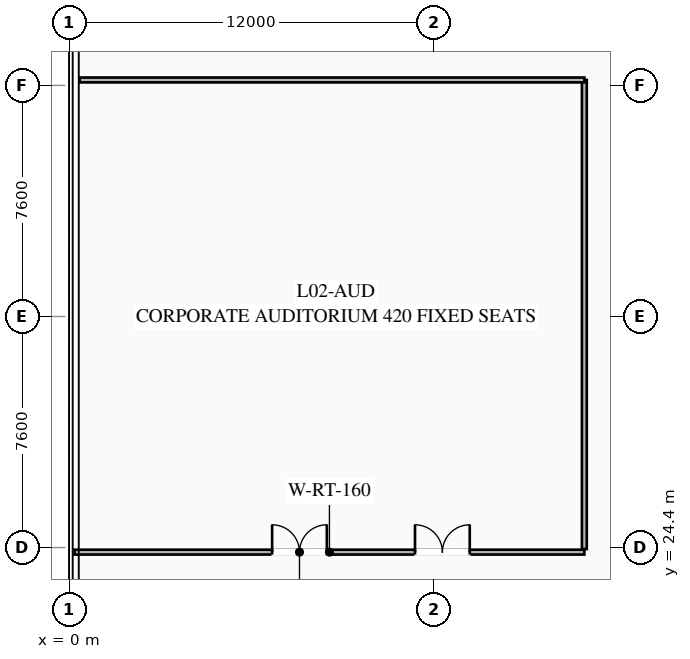
"""IFC4 building model, lengths in metres.
Left out: names, types, materials, properties, quantities, classifications, styles, units other than length and angle.
Written with IfcOpenShell. Run it as: python <this file> out.ifc"""

import sys

from ifc_helpers import new_model, si_unit, direction, frame, frame_2d, origin, place, context, subcontext, project, spatial, rectangle, extrude, element, fill, save


model = new_model("IFC4")
c1 = context("Model", 3, precision=1e-05, world=origin(), true_north=direction((0.0, 1.0)))
c2 = subcontext(c1, "Body", "Model", "MODEL_VIEW")
j1 = project(units=[si_unit("LENGTHUNIT", "METRE"), si_unit("PLANEANGLEUNIT", "RADIAN")], contexts=[c1])
p1 = place(None, origin())
s1 = spatial("IfcSite", under=j1, at=p1, CompositionType="ELEMENT")
p2 = place(p1, origin())
s2 = spatial("IfcBuilding", under=s1, at=p2, CompositionType="ELEMENT")
p3 = place(p2, frame((0.0, 0.0, 10.2)))
s3 = spatial("IfcBuildingStorey", under=s2, at=p3, CompositionType="ELEMENT", Elevation=10.2)
p4 = place(p3, frame((0.18, 24.25, 0.0), z_axis=(0.0, 0.0, 1.0), x_axis=(1.0, 0.0, 0.0)))
e1 = element("IfcWall", 1, at=p4, inside=s3, PredefinedType="PARTITIONING", context=c2, shape_type="SweptSolid", body=[
    extrude(rectangle(XDim=16.77, YDim=0.16, at=frame_2d((8.385, 0.0))), origin(), (0.0, 0.0, 1.0), 2.71),
])
p5 = place(p4, frame((6.5, 0.0, 0.0)))
e2 = element("IfcOpeningElement", 2, at=p5, cuts=e1, PredefinedType="OPENING", context=c2, shape_type="SweptSolid", body=[
    extrude(rectangle(XDim=1.8, YDim=2.4, at=frame_2d((0.9, 1.2))), frame((0.0, 0.09, 0.0), z_axis=(0.0, -1.0, 0.0), x_axis=(1.0, 0.0, 0.0)), (0.0, 0.0, 1.0), 0.18),
])
p6 = place(p4, frame((11.2, 0.0, 0.0)))
e3 = element("IfcOpeningElement", 3, at=p6, cuts=e1, PredefinedType="OPENING", context=c2, shape_type="SweptSolid", body=[
    extrude(rectangle(XDim=1.8, YDim=2.4, at=frame_2d((0.9, 1.2))), frame((0.0, 0.09, 0.0), z_axis=(0.0, -1.0, 0.0), x_axis=(1.0, 0.0, 0.0)), (0.0, 0.0, 1.0), 0.18),
])
p7 = place(p3, frame((16.95, 24.35, 0.0), z_axis=(0.0, 0.0, 1.0), x_axis=(0.0, 1.0, 0.0)))
e4 = element("IfcWall", 4, at=p7, inside=s3, PredefinedType="PARTITIONING", context=c2, shape_type="SweptSolid", body=[
    extrude(rectangle(XDim=15.43, YDim=0.16, at=frame_2d((7.715, 0.0))), origin(), (0.0, 0.0, 1.0), 2.71),
])
p8 = place(p3, frame((0.35, 39.78, 0.0), z_axis=(0.0, 0.0, 1.0), x_axis=(1.0, 0.0, 0.0)))
e5 = element("IfcWall", 5, at=p8, inside=s3, PredefinedType="PARTITIONING", context=c2, shape_type="SweptSolid", body=[
    extrude(rectangle(XDim=16.6, YDim=0.16, at=frame_2d((8.3, 0.0))), origin(), (0.0, 0.0, 1.0), 2.71),
])
p9 = place(p5, origin())
e6 = element("IfcDoor", 6, at=p9, inside=s3, OperationType="DOUBLE_DOOR_SINGLE_SWING", PredefinedType="DOOR", context=c2, shape_type="SweptSolid", body=[
    extrude(rectangle(XDim=1.8, YDim=2.4, at=frame_2d((0.9, 1.2))), frame((0.0, 0.025, 0.0), z_axis=(0.0, -1.0, 0.0), x_axis=(1.0, 0.0, 0.0)), (0.0, 0.0, 1.0), 0.05),
])
fill(e2, e6)
p10 = place(p6, origin())
e7 = element("IfcDoor", 7, at=p10, inside=s3, OperationType="DOUBLE_DOOR_SINGLE_SWING", PredefinedType="DOOR", context=c2, shape_type="SweptSolid", body=[
    extrude(rectangle(XDim=1.8, YDim=2.4, at=frame_2d((0.9, 1.2))), frame((0.0, 0.025, 0.0), z_axis=(0.0, -1.0, 0.0), x_axis=(1.0, 0.0, 0.0)), (0.0, 0.0, 1.0), 0.05),
])
fill(e3, e7)
save(model, sys.argv[1])
